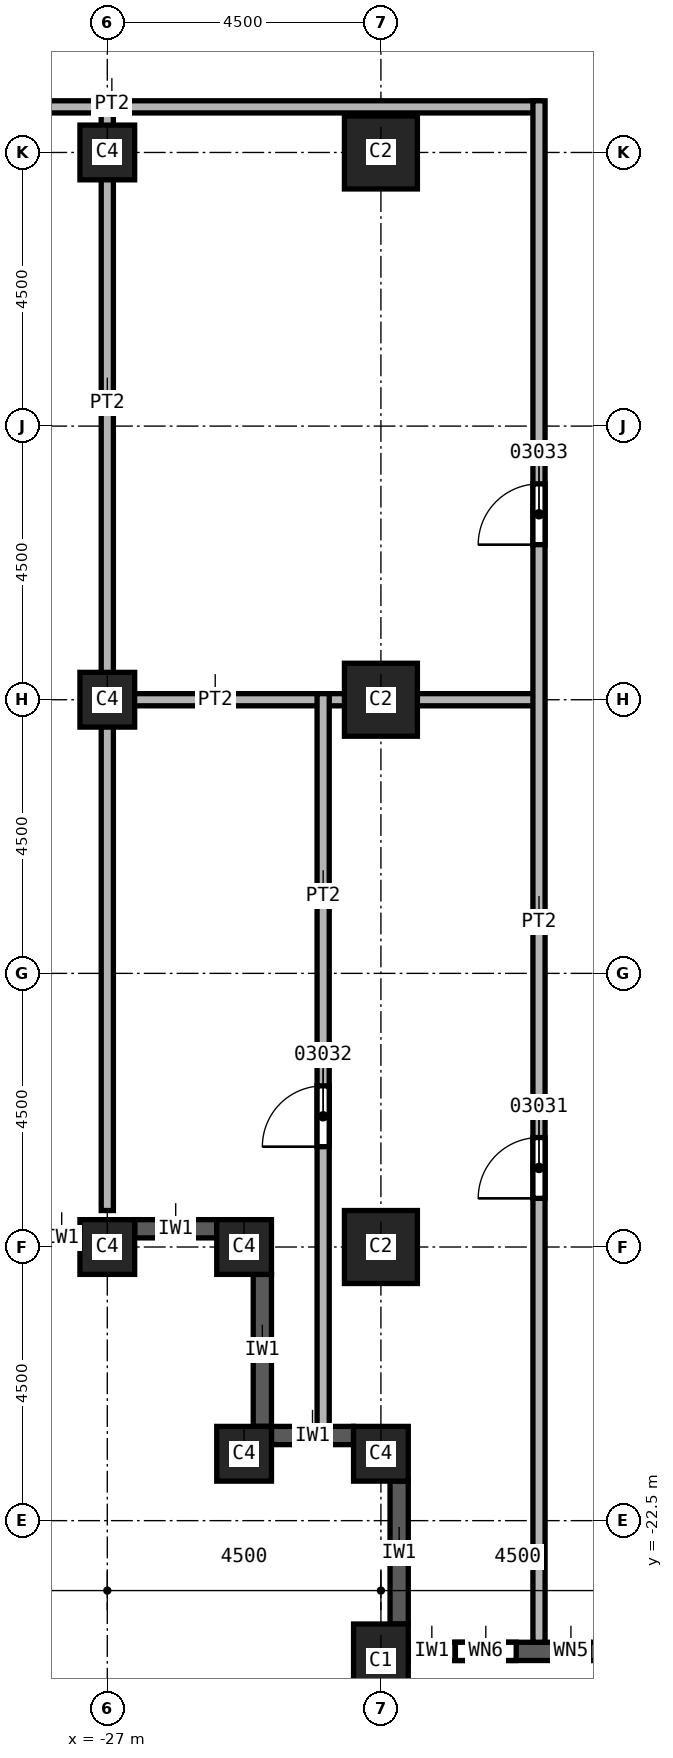
"""IFC4 building model, lengths in metres.
Left out: names, types, materials, properties, quantities, classifications, styles, units other than length and angle.
Written with IfcOpenShell. Run it as: python <this file> out.ifc"""

import sys

from ifc_helpers import new_model, si_unit, direction, frame, frame_2d, origin, origin_2d, place, context, subcontext, project, spatial, rectangle, extrude, element, fill, save


model = new_model("IFC4")
c1 = context("Model", 3, precision=1e-05, world=origin(), true_north=direction((0.0, 1.0)))
c2 = subcontext(c1, "Body", "Model", "MODEL_VIEW")
j1 = project(units=[si_unit("LENGTHUNIT", "METRE"), si_unit("PLANEANGLEUNIT", "RADIAN")], contexts=[c1])
p1 = place(None, origin())
s1 = spatial("IfcSite", under=j1, at=p1, CompositionType="ELEMENT")
p2 = place(p1, origin())
s2 = spatial("IfcBuilding", under=s1, at=p2, CompositionType="ELEMENT")
p3 = place(p2, frame((0.0, 0.0, 92.0)))
s3 = spatial("IfcBuildingStorey", under=s2, at=p3, CompositionType="ELEMENT", Elevation=92.0)
for number, where, z_axis, x_axis in (
    (1, (-22.5, 0.0, 0.0), (0.0, 0.0, 1.0), (1.0, 0.0, 0.0)),
    (2, (-22.5, -9.0, 0.0), (0.0, 0.0, 1.0), (1.0, 0.0, 0.0)),
    (3, (-22.5, -18.0, 0.0), (0.0, 0.0, 1.0), (1.0, 0.0, 0.0)),
):
    element("IfcColumn", number, at=place(p3, frame(where, z_axis=z_axis, x_axis=x_axis)), inside=s3, PredefinedType="COLUMN", context=c2, shape_type="SweptSolid", body=[
        extrude(rectangle(XDim=1.2, YDim=1.2, at=origin_2d()), origin(), (0.0, 0.0, 1.0), 3.7),
    ])
p4 = place(p3, frame((-22.5, -24.8, 0.0), z_axis=(0.0, 0.0, 1.0), x_axis=(1.0, 0.0, 0.0)))
e4 = element("IfcColumn", 4, at=p4, inside=s3, PredefinedType="COLUMN", context=c2, shape_type="SweptSolid", body=[
    extrude(rectangle(XDim=0.9, YDim=1.2, at=origin_2d()), origin(), (0.0, 0.0, 1.0), 3.7),
])
for number, where, z_axis, x_axis in (
    (5, (-27.0, 0.0, 0.0), (0.0, 0.0, 1.0), (1.0, 0.0, 0.0)),
    (6, (-27.0, -9.0, 0.0), (0.0, 0.0, 1.0), (1.0, 0.0, 0.0)),
    (7, (-27.0, -18.0, 0.0), (0.0, 0.0, 1.0), (1.0, 0.0, 0.0)),
    (8, (-22.5, -21.4, 0.0), (0.0, 0.0, 1.0), (1.0, 0.0, 0.0)),
    (9, (-24.75, -21.4, 0.0), (0.0, 0.0, 1.0), (1.0, 0.0, 0.0)),
    (10, (-24.75, -18.0, 0.0), (0.0, 0.0, 1.0), (1.0, 0.0, 0.0)),
):
    element("IfcColumn", number, at=place(p3, frame(where, z_axis=z_axis, x_axis=x_axis)), inside=s3, PredefinedType="COLUMN", context=c2, shape_type="SweptSolid", body=[
        extrude(rectangle(XDim=0.9, YDim=0.9, at=origin_2d()), origin(), (0.0, 0.0, 1.0), 3.7),
    ])
p5 = place(p3, frame((-31.05, -17.85, 0.0), z_axis=(0.0, 0.0, 1.0), x_axis=(1.0, 0.0, 0.0)))
e11 = element("IfcWall", 11, at=p5, inside=s3, PredefinedType="SOLIDWALL", context=c2, shape_type="SweptSolid", body=[
    extrude(rectangle(XDim=3.6, YDim=0.3, at=frame_2d((1.8, 0.0))), origin(), (0.0, 0.0, 1.0), 3.1),
])
p6 = place(p5, frame((0.6, 0.0, 0.8)))
e12 = element("IfcOpeningElement", 12, at=p6, cuts=e11, PredefinedType="OPENING", context=c2, shape_type="SweptSolid", body=[
    extrude(rectangle(XDim=2.4, YDim=1.95, at=frame_2d((1.2, 0.975))), frame((0.0, 0.15, 0.0), z_axis=(0.0, -1.0, 0.0), x_axis=(1.0, 0.0, 0.0)), (0.0, 0.0, 1.0), 0.3),
])
p7 = place(p3, frame((-26.55, -17.7, 0.0), z_axis=(0.0, 0.0, 1.0), x_axis=(1.0, 0.0, 0.0)))
e13 = element("IfcWall", 13, at=p7, inside=s3, PredefinedType="SOLIDWALL", context=c2, shape_type="SweptSolid", body=[
    extrude(rectangle(XDim=1.35, YDim=0.3, at=frame_2d((0.675, 0.0))), origin(), (0.0, 0.0, 1.0), 3.1),
])
p8 = place(p3, frame((-24.45, -18.45, 0.0), z_axis=(0.0, 0.0, 1.0), x_axis=(0.0, -1.0, 0.0)))
e14 = element("IfcWall", 14, at=p8, inside=s3, PredefinedType="SOLIDWALL", context=c2, shape_type="SweptSolid", body=[
    extrude(rectangle(XDim=2.5, YDim=0.3, at=frame_2d((1.25, 0.0))), origin(), (0.0, 0.0, 1.0), 3.1),
])
p9 = place(p3, frame((-24.3, -21.1, 0.0), z_axis=(0.0, 0.0, 1.0), x_axis=(1.0, 0.0, 0.0)))
e15 = element("IfcWall", 15, at=p9, inside=s3, PredefinedType="SOLIDWALL", context=c2, shape_type="SweptSolid", body=[
    extrude(rectangle(XDim=1.35, YDim=0.3, at=frame_2d((0.675, 0.0))), origin(), (0.0, 0.0, 1.0), 3.1),
])
p10 = place(p3, frame((-22.2, -21.85, 0.0), z_axis=(0.0, 0.0, 1.0), x_axis=(0.0, -1.0, 0.0)))
e16 = element("IfcWall", 16, at=p10, inside=s3, PredefinedType="SOLIDWALL", context=c2, shape_type="SweptSolid", body=[
    extrude(rectangle(XDim=2.35, YDim=0.3, at=frame_2d((1.175, 0.0))), origin(), (0.0, 0.0, 1.0), 3.1),
])
p11 = place(p3, frame((-22.05, -24.65, 0.0), z_axis=(0.0, 0.0, 1.0), x_axis=(1.0, 0.0, 0.0)))
e17 = element("IfcWall", 17, at=p11, inside=s3, PredefinedType="SOLIDWALL", context=c2, shape_type="SweptSolid", body=[
    extrude(rectangle(XDim=3.6, YDim=0.3, at=frame_2d((1.8, 0.0))), origin(), (0.0, 0.0, 1.0), 3.1),
])
p12 = place(p11, frame((0.775, 0.0, 0.8)))
e18 = element("IfcOpeningElement", 18, at=p12, cuts=e17, PredefinedType="OPENING", context=c2, shape_type="SweptSolid", body=[
    extrude(rectangle(XDim=1.0, YDim=1.95, at=frame_2d((0.5, 0.975))), frame((0.0, 0.15, 0.0), z_axis=(0.0, -1.0, 0.0), x_axis=(1.0, 0.0, 0.0)), (0.0, 0.0, 1.0), 0.3),
])
p13 = place(p11, frame((2.375, 0.0, 0.8)))
e19 = element("IfcOpeningElement", 19, at=p13, cuts=e17, PredefinedType="OPENING", context=c2, shape_type="SweptSolid", body=[
    extrude(rectangle(XDim=0.6, YDim=1.95, at=frame_2d((0.3, 0.975))), frame((0.0, 0.15, 0.0), z_axis=(0.0, -1.0, 0.0), x_axis=(1.0, 0.0, 0.0)), (0.0, 0.0, 1.0), 0.3),
])
p14 = place(p3, frame((-27.1, -9.0, 0.0), z_axis=(0.0, 0.0, 1.0), x_axis=(1.0, 0.0, 0.0)))
e20 = element("IfcWall", 20, at=p14, inside=s3, PredefinedType="PARTITIONING", context=c2, shape_type="SweptSolid", body=[
    extrude(rectangle(XDim=7.2, YDim=0.2, at=frame_2d((3.6, 0.0))), origin(), (0.0, 0.0, 1.0), 3.7),
])
p15 = place(p3, frame((-27.0, -17.4, 0.0), z_axis=(0.0, 0.0, 1.0), x_axis=(0.0, 1.0, 0.0)))
e21 = element("IfcWall", 21, at=p15, inside=s3, PredefinedType="PARTITIONING", context=c2, shape_type="SweptSolid", body=[
    extrude(rectangle(XDim=18.15, YDim=0.2, at=frame_2d((9.075, 0.0))), origin(), (0.0, 0.0, 1.0), 3.7),
])
p16 = place(p3, frame((-19.9, 0.75, 0.0), z_axis=(0.0, 0.0, 1.0), x_axis=(-1.0, 0.0, 0.0)))
e22 = element("IfcWall", 22, at=p16, inside=s3, PredefinedType="PARTITIONING", context=c2, shape_type="SweptSolid", body=[
    extrude(rectangle(XDim=13.95, YDim=0.2, at=frame_2d((6.975, 0.0))), origin(), (0.0, 0.0, 1.0), 3.7),
])
p17 = place(p3, frame((-23.45, -20.95, 0.0), z_axis=(0.0, 0.0, 1.0), x_axis=(0.0, 1.0, 0.0)))
e23 = element("IfcWall", 23, at=p17, inside=s3, PredefinedType="PARTITIONING", context=c2, shape_type="SweptSolid", body=[
    extrude(rectangle(XDim=12.05, YDim=0.2, at=frame_2d((6.025, 0.0))), origin(), (0.0, 0.0, 1.0), 3.7),
])
p18 = place(p17, frame((4.6, 0.0, 0.0)))
e24 = element("IfcOpeningElement", 24, at=p18, cuts=e23, PredefinedType="OPENING", context=c2, shape_type="SweptSolid", body=[
    extrude(rectangle(XDim=1.0, YDim=2.1, at=frame_2d((0.5, 1.05))), frame((0.0, 0.1, 0.0), z_axis=(0.0, -1.0, 0.0), x_axis=(1.0, 0.0, 0.0)), (0.0, 0.0, 1.0), 0.2),
])
p19 = place(p3, frame((-19.9, -24.5, 0.0), z_axis=(0.0, 0.0, 1.0), x_axis=(0.0, 1.0, 0.0)))
e25 = element("IfcWall", 25, at=p19, inside=s3, PredefinedType="PARTITIONING", context=c2, shape_type="SweptSolid", body=[
    extrude(rectangle(XDim=25.35, YDim=0.2, at=frame_2d((12.675, 0.0))), origin(), (0.0, 0.0, 1.0), 3.7),
])
p20 = place(p19, frame((7.3, 0.0, 0.0)))
e26 = element("IfcOpeningElement", 26, at=p20, cuts=e25, PredefinedType="OPENING", context=c2, shape_type="SweptSolid", body=[
    extrude(rectangle(XDim=1.0, YDim=2.1, at=frame_2d((0.5, 1.05))), frame((0.0, 0.1, 0.0), z_axis=(0.0, -1.0, 0.0), x_axis=(1.0, 0.0, 0.0)), (0.0, 0.0, 1.0), 0.2),
])
p21 = place(p19, frame((18.05, 0.0, 0.0)))
e27 = element("IfcOpeningElement", 27, at=p21, cuts=e25, PredefinedType="OPENING", context=c2, shape_type="SweptSolid", body=[
    extrude(rectangle(XDim=1.0, YDim=2.1, at=frame_2d((0.5, 1.05))), frame((0.0, 0.1, 0.0), z_axis=(0.0, -1.0, 0.0), x_axis=(1.0, 0.0, 0.0)), (0.0, 0.0, 1.0), 0.2),
])
p22 = place(p20, origin())
e28 = element("IfcDoor", 28, at=p22, inside=s3, OperationType="SINGLE_SWING_RIGHT", PredefinedType="DOOR", context=c2, shape_type="SweptSolid", body=[
    extrude(rectangle(XDim=1.0, YDim=2.1, at=frame_2d((0.5, 1.05))), frame((0.0, 0.025, 0.0), z_axis=(0.0, -1.0, 0.0), x_axis=(1.0, 0.0, 0.0)), (0.0, 0.0, 1.0), 0.05),
])
fill(e26, e28)
p23 = place(p18, origin())
e29 = element("IfcDoor", 29, at=p23, inside=s3, OperationType="SINGLE_SWING_LEFT", PredefinedType="DOOR", context=c2, shape_type="SweptSolid", body=[
    extrude(rectangle(XDim=1.0, YDim=2.1, at=frame_2d((0.5, 1.05))), frame((0.0, 0.025, 0.0), z_axis=(0.0, -1.0, 0.0), x_axis=(1.0, 0.0, 0.0)), (0.0, 0.0, 1.0), 0.05),
])
fill(e24, e29)
p24 = place(p21, origin())
e30 = element("IfcDoor", 30, at=p24, inside=s3, OperationType="SINGLE_SWING_RIGHT", PredefinedType="DOOR", context=c2, shape_type="SweptSolid", body=[
    extrude(rectangle(XDim=1.0, YDim=2.1, at=frame_2d((0.5, 1.05))), frame((0.0, 0.025, 0.0), z_axis=(0.0, -1.0, 0.0), x_axis=(1.0, 0.0, 0.0)), (0.0, 0.0, 1.0), 0.05),
])
fill(e27, e30)
p25 = place(p12, origin())
e31 = element("IfcWindow", 31, at=p25, inside=s3, PartitioningType="SINGLE_PANEL", PredefinedType="WINDOW", context=c2, shape_type="SweptSolid", body=[
    extrude(rectangle(XDim=1.0, YDim=1.95, at=frame_2d((0.5, 0.975))), frame((0.0, 0.03, 0.0), z_axis=(0.0, -1.0, 0.0), x_axis=(1.0, 0.0, 0.0)), (0.0, 0.0, 1.0), 0.06),
])
fill(e18, e31)
p26 = place(p13, origin())
e32 = element("IfcWindow", 32, at=p26, inside=s3, PartitioningType="SINGLE_PANEL", PredefinedType="WINDOW", context=c2, shape_type="SweptSolid", body=[
    extrude(rectangle(XDim=0.6, YDim=1.95, at=frame_2d((0.3, 0.975))), frame((0.0, 0.03, 0.0), z_axis=(0.0, -1.0, 0.0), x_axis=(1.0, 0.0, 0.0)), (0.0, 0.0, 1.0), 0.06),
])
fill(e19, e32)
save(model, sys.argv[1])
